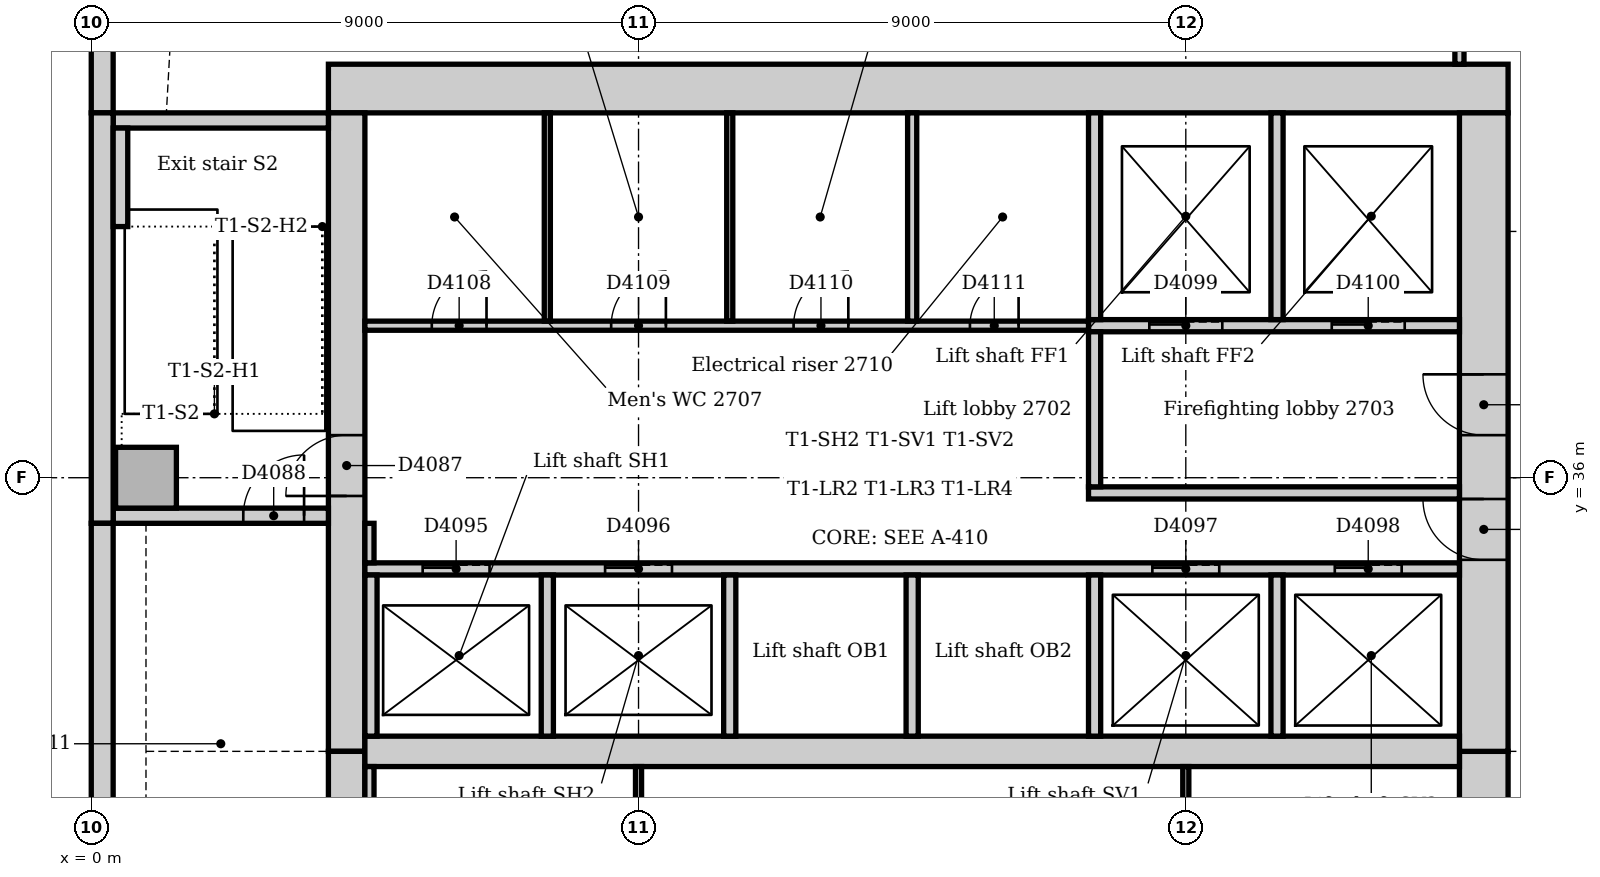
"""IFC4 building model, lengths in metres.
Left out: names, types, materials, properties, quantities, classifications, styles, units other than length and angle.
Written with IfcOpenShell. Run it as: python <this file> out.ifc"""

import sys

from ifc_helpers import new_model, si_unit, direction, frame, frame_2d, origin, origin_2d, place, context, subcontext, project, spatial, rectangle, extrude, element, fill, save


model = new_model("IFC4")
c1 = context("Model", 3, precision=1e-05, world=origin(), true_north=direction((0.0, 1.0)))
c2 = subcontext(c1, "Body", "Model", "MODEL_VIEW")
j1 = project(units=[si_unit("LENGTHUNIT", "METRE"), si_unit("PLANEANGLEUNIT", "RADIAN")], contexts=[c1])
p1 = place(None, origin())
s1 = spatial("IfcSite", under=j1, at=p1, CompositionType="ELEMENT")
p2 = place(p1, origin())
s2 = spatial("IfcBuilding", under=s1, at=p2, CompositionType="ELEMENT")
p3 = place(p2, frame((0.0, 0.0, 116.0)))
s3 = spatial("IfcBuildingStorey", under=s2, at=p3, CompositionType="ELEMENT", Elevation=116.0)
p4 = place(p3, frame((23.3, 42.4, 0.0), z_axis=(0.0, 0.0, 1.0), x_axis=(-1.0, 0.0, 0.0)))
e1 = element("IfcWall", 1, at=p4, inside=s3, PredefinedType="SOLIDWALL", context=c2, shape_type="SweptSolid", body=[
    extrude(rectangle(XDim=19.4, YDim=0.8, at=frame_2d((9.7, 0.0))), origin(), (0.0, 0.0, 1.0), 4.0),
])
p5 = place(p3, frame((22.9, 21.0, 0.0), z_axis=(0.0, 0.0, 1.0), x_axis=(0.0, 1.0, 0.0)))
e2 = element("IfcWall", 2, at=p5, inside=s3, PredefinedType="SOLIDWALL", context=c2, shape_type="SweptSolid", body=[
    extrude(rectangle(XDim=10.5, YDim=0.8, at=frame_2d((5.25, 0.0))), origin(), (0.0, 0.0, 1.0), 4.0),
])
p6 = place(p5, frame((4.35, 0.0, 0.0)))
e3 = element("IfcOpeningElement", 3, at=p6, cuts=e2, PredefinedType="OPENING", context=c2, shape_type="SweptSolid", body=[
    extrude(rectangle(XDim=1.8, YDim=2.1, at=frame_2d((0.9, 1.05))), frame((0.0, 0.41, 0.0), z_axis=(0.0, -1.0, 0.0), x_axis=(1.0, 0.0, 0.0)), (0.0, 0.0, 1.0), 0.82),
])
p7 = place(p3, frame((22.9, 31.5, 0.0), z_axis=(0.0, 0.0, 1.0), x_axis=(0.0, 1.0, 0.0)))
e4 = element("IfcWall", 4, at=p7, inside=s3, PredefinedType="SOLIDWALL", context=c2, shape_type="SweptSolid", body=[
    extrude(rectangle(XDim=10.5, YDim=0.8, at=frame_2d((5.25, 0.0))), origin(), (0.0, 0.0, 1.0), 4.0),
])
p8 = place(p7, frame((3.15, 0.0, 0.0)))
e5 = element("IfcOpeningElement", 5, at=p8, cuts=e4, PredefinedType="OPENING", context=c2, shape_type="SweptSolid", body=[
    extrude(rectangle(XDim=1.0, YDim=2.1, at=frame_2d((0.5, 1.05))), frame((0.0, 0.41, 0.0), z_axis=(0.0, -1.0, 0.0), x_axis=(1.0, 0.0, 0.0)), (0.0, 0.0, 1.0), 0.82),
])
p9 = place(p7, frame((5.2, 0.0, 0.0)))
e6 = element("IfcOpeningElement", 6, at=p9, cuts=e4, PredefinedType="OPENING", context=c2, shape_type="SweptSolid", body=[
    extrude(rectangle(XDim=1.0, YDim=2.1, at=frame_2d((0.5, 1.05))), frame((0.0, 0.41, 0.0), z_axis=(0.0, -1.0, 0.0), x_axis=(1.0, 0.0, 0.0)), (0.0, 0.0, 1.0), 0.82),
])
p10 = place(p3, frame((4.2, 42.0, 0.0), z_axis=(0.0, 0.0, 1.0), x_axis=(0.0, -1.0, 0.0)))
e7 = element("IfcWall", 7, at=p10, inside=s3, PredefinedType="SOLIDWALL", context=c2, shape_type="SweptSolid", body=[
    extrude(rectangle(XDim=10.5, YDim=0.6, at=frame_2d((5.25, 0.0))), origin(), (0.0, 0.0, 1.0), 4.0),
])
p11 = place(p10, frame((5.3, 0.0, 0.0)))
e8 = element("IfcOpeningElement", 8, at=p11, cuts=e7, PredefinedType="OPENING", context=c2, shape_type="SweptSolid", body=[
    extrude(rectangle(XDim=1.0, YDim=2.1, at=frame_2d((0.5, 1.05))), frame((0.0, 0.31, 0.0), z_axis=(0.0, -1.0, 0.0), x_axis=(1.0, 0.0, 0.0)), (0.0, 0.0, 1.0), 0.62),
])
p12 = place(p3, frame((4.2, 31.5, 0.0), z_axis=(0.0, 0.0, 1.0), x_axis=(0.0, -1.0, 0.0)))
e9 = element("IfcWall", 9, at=p12, inside=s3, PredefinedType="SOLIDWALL", context=c2, shape_type="SweptSolid", body=[
    extrude(rectangle(XDim=10.5, YDim=0.6, at=frame_2d((5.25, 0.0))), origin(), (0.0, 0.0, 1.0), 4.0),
])
p13 = place(p12, frame((4.25, 0.0, 0.0)))
e10 = element("IfcOpeningElement", 10, at=p13, cuts=e9, PredefinedType="OPENING", context=c2, shape_type="SweptSolid", body=[
    extrude(rectangle(XDim=1.0, YDim=2.1, at=frame_2d((0.5, 1.05))), frame((0.0, 0.31, 0.0), z_axis=(0.0, -1.0, 0.0), x_axis=(1.0, 0.0, 0.0)), (0.0, 0.0, 1.0), 0.62),
])
p14 = place(p3, frame((4.5, 31.5, 0.0), z_axis=(0.0, 0.0, 1.0), x_axis=(1.0, 0.0, 0.0)))
e11 = element("IfcWall", 11, at=p14, inside=s3, PredefinedType="SOLIDWALL", context=c2, shape_type="SweptSolid", body=[
    extrude(rectangle(XDim=18.0, YDim=0.5, at=frame_2d((9.0, 0.0))), origin(), (0.0, 0.0, 1.0), 4.0),
])
p15 = place(p3, frame((0.36, 35.375, 0.0), z_axis=(0.0, 0.0, 1.0), x_axis=(1.0, 0.0, 0.0)))
e12 = element("IfcWall", 12, at=p15, inside=s3, PredefinedType="SOLIDWALL", context=c2, shape_type="SweptSolid", body=[
    extrude(rectangle(XDim=3.54, YDim=0.25, at=frame_2d((1.77, 0.0))), origin(), (0.0, 0.0, 1.0), 4.0),
])
p16 = place(p15, frame((2.14, 0.0, 0.0)))
e13 = element("IfcOpeningElement", 13, at=p16, cuts=e12, PredefinedType="OPENING", context=c2, shape_type="SweptSolid", body=[
    extrude(rectangle(XDim=1.0, YDim=2.1, at=frame_2d((0.5, 1.05))), frame((0.0, 0.135, 0.0), z_axis=(0.0, -1.0, 0.0), x_axis=(1.0, 0.0, 0.0)), (0.0, 0.0, 1.0), 0.27),
])
p17 = place(p3, frame((3.9, 41.875, 0.0), z_axis=(0.0, 0.0, 1.0), x_axis=(-1.0, 0.0, 0.0)))
e14 = element("IfcWall", 14, at=p17, inside=s3, PredefinedType="SOLIDWALL", context=c2, shape_type="SweptSolid", body=[
    extrude(rectangle(XDim=3.54, YDim=0.25, at=frame_2d((1.77, 0.0))), origin(), (0.0, 0.0, 1.0), 4.0),
])
p18 = place(p3, frame((0.9, 36.0, 0.0), z_axis=(0.0, 0.0, 1.0), x_axis=(1.0, 0.0, 0.0)))
e15 = element("IfcColumn", 15, at=p18, inside=s3, PredefinedType="COLUMN", context=c2, shape_type="SweptSolid", body=[
    extrude(rectangle(XDim=1.0, YDim=1.0, at=origin_2d()), origin(), (0.0, 0.0, 1.0), 4.0),
])
p19 = place(p3, frame((0.18, 45.257, 0.0), z_axis=(0.0, 0.0, 1.0), x_axis=(0.0, -1.0, 0.0)))
e16 = element("IfcWall", 16, at=p19, inside=s3, PredefinedType="STANDARD", context=c2, shape_type="SweptSolid", body=[
    extrude(rectangle(XDim=3.257, YDim=0.36, at=frame_2d((1.629, 0.0))), origin(), (0.0, 0.0, 1.0), 3.85),
])
p20 = place(p3, frame((0.18, 42.0, 0.0), z_axis=(0.0, 0.0, 1.0), x_axis=(0.0, -1.0, 0.0)))
e17 = element("IfcWall", 17, at=p20, inside=s3, PredefinedType="STANDARD", context=c2, shape_type="SweptSolid", body=[
    extrude(rectangle(XDim=6.75, YDim=0.36, at=frame_2d((3.375, 0.0))), origin(), (0.0, 0.0, 1.0), 3.85),
])
p21 = place(p3, frame((0.18, 35.25, 0.0), z_axis=(0.0, 0.0, 1.0), x_axis=(0.0, -1.0, 0.0)))
e18 = element("IfcWall", 18, at=p21, inside=s3, PredefinedType="STANDARD", context=c2, shape_type="SweptSolid", body=[
    extrude(rectangle(XDim=7.5, YDim=0.36, at=frame_2d((3.75, 0.0))), origin(), (0.0, 0.0, 1.0), 3.85),
])
p22 = place(p3, frame((0.48, 40.13, 0.0), z_axis=(0.0, 0.0, 1.0), x_axis=(0.0, 1.0, 0.0)))
e19 = element("IfcWall", 19, at=p22, inside=s3, PredefinedType="STANDARD", context=c2, shape_type="SweptSolid", body=[
    extrude(rectangle(XDim=1.62, YDim=0.24, at=frame_2d((0.81, 0.0))), origin(), (0.0, 0.0, 1.0), 4.0),
])
p23 = place(p3, frame((16.4, 35.75, 0.0), z_axis=(0.0, 0.0, 1.0), x_axis=(1.0, 0.0, 0.0)))
e20 = element("IfcWall", 20, at=p23, inside=s3, PredefinedType="PARTITIONING", context=c2, shape_type="SweptSolid", body=[
    extrude(rectangle(XDim=6.1, YDim=0.2, at=frame_2d((3.05, 0.0))), origin(), (0.0, 0.0, 1.0), 3.85),
])
p24 = place(p3, frame((16.4, 38.5, 0.0), z_axis=(0.0, 0.0, 1.0), x_axis=(1.0, 0.0, 0.0)))
e21 = element("IfcWall", 21, at=p24, inside=s3, PredefinedType="PARTITIONING", context=c2, shape_type="SweptSolid", body=[
    extrude(rectangle(XDim=6.1, YDim=0.2, at=frame_2d((3.05, 0.0))), origin(), (0.0, 0.0, 1.0), 3.85),
])
p25 = place(p24, frame((1.0, 0.0, 0.0)))
e22 = element("IfcOpeningElement", 22, at=p25, cuts=e21, PredefinedType="OPENING", context=c2, shape_type="SweptSolid", body=[
    extrude(rectangle(XDim=1.2, YDim=2.1, at=frame_2d((0.6, 1.05))), frame((0.0, 0.11, 0.0), z_axis=(0.0, -1.0, 0.0), x_axis=(1.0, 0.0, 0.0)), (0.0, 0.0, 1.0), 0.22),
])
p26 = place(p24, frame((4.0, 0.0, 0.0)))
e23 = element("IfcOpeningElement", 23, at=p26, cuts=e21, PredefinedType="OPENING", context=c2, shape_type="SweptSolid", body=[
    extrude(rectangle(XDim=1.2, YDim=2.1, at=frame_2d((0.6, 1.05))), frame((0.0, 0.11, 0.0), z_axis=(0.0, -1.0, 0.0), x_axis=(1.0, 0.0, 0.0)), (0.0, 0.0, 1.0), 0.22),
])
p27 = place(p3, frame((16.5, 35.85, 0.0), z_axis=(0.0, 0.0, 1.0), x_axis=(0.0, 1.0, 0.0)))
e24 = element("IfcWall", 24, at=p27, inside=s3, PredefinedType="PARTITIONING", context=c2, shape_type="SweptSolid", body=[
    extrude(rectangle(XDim=2.55, YDim=0.2, at=frame_2d((1.275, 0.0))), origin(), (0.0, 0.0, 1.0), 3.85),
])
p28 = place(p3, frame((4.5, 34.5, 0.0), z_axis=(0.0, 0.0, 1.0), x_axis=(1.0, 0.0, 0.0)))
e25 = element("IfcWall", 25, at=p28, inside=s3, PredefinedType="PARTITIONING", context=c2, shape_type="SweptSolid", body=[
    extrude(rectangle(XDim=18.0, YDim=0.2, at=frame_2d((9.0, 0.0))), origin(), (0.0, 0.0, 1.0), 3.85),
])
p29 = place(p28, frame((0.95, 0.0, 0.0)))
e26 = element("IfcOpeningElement", 26, at=p29, cuts=e25, PredefinedType="OPENING", context=c2, shape_type="SweptSolid", body=[
    extrude(rectangle(XDim=1.1, YDim=2.1, at=frame_2d((0.55, 1.05))), frame((0.0, 0.11, 0.0), z_axis=(0.0, -1.0, 0.0), x_axis=(1.0, 0.0, 0.0)), (0.0, 0.0, 1.0), 0.22),
])
p30 = place(p28, frame((3.95, 0.0, 0.0)))
e27 = element("IfcOpeningElement", 27, at=p30, cuts=e25, PredefinedType="OPENING", context=c2, shape_type="SweptSolid", body=[
    extrude(rectangle(XDim=1.1, YDim=2.1, at=frame_2d((0.55, 1.05))), frame((0.0, 0.11, 0.0), z_axis=(0.0, -1.0, 0.0), x_axis=(1.0, 0.0, 0.0)), (0.0, 0.0, 1.0), 0.22),
])
p31 = place(p28, frame((12.95, 0.0, 0.0)))
e28 = element("IfcOpeningElement", 28, at=p31, cuts=e25, PredefinedType="OPENING", context=c2, shape_type="SweptSolid", body=[
    extrude(rectangle(XDim=1.1, YDim=2.1, at=frame_2d((0.55, 1.05))), frame((0.0, 0.11, 0.0), z_axis=(0.0, -1.0, 0.0), x_axis=(1.0, 0.0, 0.0)), (0.0, 0.0, 1.0), 0.22),
])
p32 = place(p28, frame((15.95, 0.0, 0.0)))
e29 = element("IfcOpeningElement", 29, at=p32, cuts=e25, PredefinedType="OPENING", context=c2, shape_type="SweptSolid", body=[
    extrude(rectangle(XDim=1.1, YDim=2.1, at=frame_2d((0.55, 1.05))), frame((0.0, 0.11, 0.0), z_axis=(0.0, -1.0, 0.0), x_axis=(1.0, 0.0, 0.0)), (0.0, 0.0, 1.0), 0.22),
])
for number, where, z_axis, x_axis in (
    (30, (16.5, 38.6, 0.0), (0.0, 0.0, 1.0), (0.0, 1.0, 0.0)),
    (31, (19.5, 38.6, 0.0), (0.0, 0.0, 1.0), (0.0, 1.0, 0.0)),
):
    element("IfcWall", number, at=place(p3, frame(where, z_axis=z_axis, x_axis=x_axis)), inside=s3, PredefinedType="PARTITIONING", context=c2, shape_type="SweptSolid", body=[
        extrude(rectangle(XDim=3.4, YDim=0.2, at=frame_2d((1.7, 0.0))), origin(), (0.0, 0.0, 1.0), 3.85),
    ])
for number, where, z_axis, x_axis in (
    (32, (4.6, 31.75, 0.0), (0.0, 0.0, 1.0), (0.0, 1.0, 0.0)),
    (33, (7.5, 31.75, 0.0), (0.0, 0.0, 1.0), (0.0, 1.0, 0.0)),
    (34, (10.5, 31.75, 0.0), (0.0, 0.0, 1.0), (0.0, 1.0, 0.0)),
    (35, (13.5, 31.75, 0.0), (0.0, 0.0, 1.0), (0.0, 1.0, 0.0)),
    (36, (16.5, 31.75, 0.0), (0.0, 0.0, 1.0), (0.0, 1.0, 0.0)),
    (37, (19.5, 31.75, 0.0), (0.0, 0.0, 1.0), (0.0, 1.0, 0.0)),
):
    element("IfcWall", number, at=place(p3, frame(where, z_axis=z_axis, x_axis=x_axis)), inside=s3, PredefinedType="PARTITIONING", context=c2, shape_type="SweptSolid", body=[
        extrude(rectangle(XDim=2.65, YDim=0.2, at=frame_2d((1.325, 0.0))), origin(), (0.0, 0.0, 1.0), 3.85),
    ])
p33 = place(p3, frame((4.5, 38.5, 0.0), z_axis=(0.0, 0.0, 1.0), x_axis=(1.0, 0.0, 0.0)))
e38 = element("IfcWall", 38, at=p33, inside=s3, PredefinedType="PARTITIONING", context=c2, shape_type="SweptSolid", body=[
    extrude(rectangle(XDim=11.9, YDim=0.15, at=frame_2d((5.95, 0.0))), origin(), (0.0, 0.0, 1.0), 3.85),
])
p34 = place(p33, frame((1.1, 0.0, 0.0)))
e39 = element("IfcOpeningElement", 39, at=p34, cuts=e38, PredefinedType="OPENING", context=c2, shape_type="SweptSolid", body=[
    extrude(rectangle(XDim=0.9, YDim=2.1, at=frame_2d((0.45, 1.05))), frame((0.0, 0.085, 0.0), z_axis=(0.0, -1.0, 0.0), x_axis=(1.0, 0.0, 0.0)), (0.0, 0.0, 1.0), 0.17),
])
p35 = place(p33, frame((4.05, 0.0, 0.0)))
e40 = element("IfcOpeningElement", 40, at=p35, cuts=e38, PredefinedType="OPENING", context=c2, shape_type="SweptSolid", body=[
    extrude(rectangle(XDim=0.9, YDim=2.1, at=frame_2d((0.45, 1.05))), frame((0.0, 0.085, 0.0), z_axis=(0.0, -1.0, 0.0), x_axis=(1.0, 0.0, 0.0)), (0.0, 0.0, 1.0), 0.17),
])
p36 = place(p33, frame((7.05, 0.0, 0.0)))
e41 = element("IfcOpeningElement", 41, at=p36, cuts=e38, PredefinedType="OPENING", context=c2, shape_type="SweptSolid", body=[
    extrude(rectangle(XDim=0.9, YDim=2.1, at=frame_2d((0.45, 1.05))), frame((0.0, 0.085, 0.0), z_axis=(0.0, -1.0, 0.0), x_axis=(1.0, 0.0, 0.0)), (0.0, 0.0, 1.0), 0.17),
])
p37 = place(p33, frame((9.95, 0.0, 0.0)))
e42 = element("IfcOpeningElement", 42, at=p37, cuts=e38, PredefinedType="OPENING", context=c2, shape_type="SweptSolid", body=[
    extrude(rectangle(XDim=0.8, YDim=2.1, at=frame_2d((0.4, 1.05))), frame((0.0, 0.085, 0.0), z_axis=(0.0, -1.0, 0.0), x_axis=(1.0, 0.0, 0.0)), (0.0, 0.0, 1.0), 0.17),
])
p38 = place(p3, frame((4.575, 28.575, 0.0), z_axis=(0.0, 0.0, 1.0), x_axis=(0.0, 1.0, 0.0)))
e43 = element("IfcWall", 43, at=p38, inside=s3, PredefinedType="PARTITIONING", context=c2, shape_type="SweptSolid", body=[
    extrude(rectangle(XDim=2.675, YDim=0.15, at=frame_2d((1.337, 0.0))), origin(), (0.0, 0.0, 1.0), 3.85),
])
p39 = place(p3, frame((22.5, 42.8, 0.0), z_axis=(0.0, 0.0, 1.0), x_axis=(0.0, 1.0, 0.0)))
e44 = element("IfcWall", 44, at=p39, inside=s3, PredefinedType="PARTITIONING", context=c2, shape_type="SweptSolid", body=[
    extrude(rectangle(XDim=1.725, YDim=0.15, at=frame_2d((0.863, 0.0))), origin(), (0.0, 0.0, 1.0), 3.85),
])
p40 = place(p3, frame((4.575, 34.6, 0.0), z_axis=(0.0, 0.0, 1.0), x_axis=(0.0, 1.0, 0.0)))
e45 = element("IfcWall", 45, at=p40, inside=s3, PredefinedType="PARTITIONING", context=c2, shape_type="SweptSolid", body=[
    extrude(rectangle(XDim=0.65, YDim=0.15, at=frame_2d((0.325, 0.0))), origin(), (0.0, 0.0, 1.0), 3.85),
])
p41 = place(p3, frame((13.5, 38.575, 0.0), z_axis=(0.0, 0.0, 1.0), x_axis=(0.0, 1.0, 0.0)))
e46 = element("IfcWall", 46, at=p41, inside=s3, PredefinedType="PARTITIONING", context=c2, shape_type="SweptSolid", body=[
    extrude(rectangle(XDim=3.425, YDim=0.15, at=frame_2d((1.712, 0.0))), origin(), (0.0, 0.0, 1.0), 3.85),
])
for number, where, z_axis, x_axis in (
    (47, (7.5, 38.575, 0.0), (0.0, 0.0, 1.0), (0.0, 1.0, 0.0)),
    (48, (10.5, 38.575, 0.0), (0.0, 0.0, 1.0), (0.0, 1.0, 0.0)),
):
    element("IfcWall", number, at=place(p3, frame(where, z_axis=z_axis, x_axis=x_axis)), inside=s3, PredefinedType="PARTITIONING", context=c2, shape_type="SweptSolid", body=[
        extrude(rectangle(XDim=3.425, YDim=0.1, at=frame_2d((1.712, 0.0))), origin(), (0.0, 0.0, 1.0), 3.85),
    ])
for number, where, z_axis, x_axis in (
    (49, (9.0, 28.575, 0.0), (0.0, 0.0, 1.0), (0.0, 1.0, 0.0)),
    (50, (18.0, 28.575, 0.0), (0.0, 0.0, 1.0), (0.0, 1.0, 0.0)),
):
    element("IfcWall", number, at=place(p3, frame(where, z_axis=z_axis, x_axis=x_axis)), inside=s3, PredefinedType="PARTITIONING", context=c2, shape_type="SweptSolid", body=[
        extrude(rectangle(XDim=2.675, YDim=0.1, at=frame_2d((1.337, 0.0))), origin(), (0.0, 0.0, 1.0), 3.85),
    ])
p42 = place(p11, frame((1.0, 0.0, 0.0), z_axis=(0.0, 0.0, 1.0), x_axis=(-1.0, 0.0, 0.0)))
e51 = element("IfcDoor", 51, at=p42, inside=s3, OperationType="SINGLE_SWING_LEFT", PredefinedType="DOOR", context=c2, shape_type="SweptSolid", body=[
    extrude(rectangle(XDim=1.0, YDim=2.1, at=frame_2d((0.5, 1.05))), frame((0.0, 0.025, 0.0), z_axis=(0.0, -1.0, 0.0), x_axis=(1.0, 0.0, 0.0)), (0.0, 0.0, 1.0), 0.05),
])
fill(e8, e51)
p43 = place(p16, origin())
e52 = element("IfcDoor", 52, at=p43, inside=s3, OperationType="SINGLE_SWING_RIGHT", PredefinedType="DOOR", context=c2, shape_type="SweptSolid", body=[
    extrude(rectangle(XDim=1.0, YDim=2.1, at=frame_2d((0.5, 1.05))), frame((0.0, 0.025, 0.0), z_axis=(0.0, -1.0, 0.0), x_axis=(1.0, 0.0, 0.0)), (0.0, 0.0, 1.0), 0.05),
])
fill(e13, e52)
p44 = place(p29, origin())
e53 = element("IfcDoor", 53, at=p44, inside=s3, OperationType="SLIDING_TO_LEFT", PredefinedType="DOOR", context=c2, shape_type="SweptSolid", body=[
    extrude(rectangle(XDim=1.1, YDim=2.1, at=frame_2d((0.55, 1.05))), frame((0.0, 0.025, 0.0), z_axis=(0.0, -1.0, 0.0), x_axis=(1.0, 0.0, 0.0)), (0.0, 0.0, 1.0), 0.05),
])
fill(e26, e53)
p45 = place(p30, origin())
e54 = element("IfcDoor", 54, at=p45, inside=s3, OperationType="SLIDING_TO_LEFT", PredefinedType="DOOR", context=c2, shape_type="SweptSolid", body=[
    extrude(rectangle(XDim=1.1, YDim=2.1, at=frame_2d((0.55, 1.05))), frame((0.0, 0.025, 0.0), z_axis=(0.0, -1.0, 0.0), x_axis=(1.0, 0.0, 0.0)), (0.0, 0.0, 1.0), 0.05),
])
fill(e27, e54)
p46 = place(p31, origin())
e55 = element("IfcDoor", 55, at=p46, inside=s3, OperationType="SLIDING_TO_LEFT", PredefinedType="DOOR", context=c2, shape_type="SweptSolid", body=[
    extrude(rectangle(XDim=1.1, YDim=2.1, at=frame_2d((0.55, 1.05))), frame((0.0, 0.025, 0.0), z_axis=(0.0, -1.0, 0.0), x_axis=(1.0, 0.0, 0.0)), (0.0, 0.0, 1.0), 0.05),
])
fill(e28, e55)
p47 = place(p32, origin())
e56 = element("IfcDoor", 56, at=p47, inside=s3, OperationType="SLIDING_TO_LEFT", PredefinedType="DOOR", context=c2, shape_type="SweptSolid", body=[
    extrude(rectangle(XDim=1.1, YDim=2.1, at=frame_2d((0.55, 1.05))), frame((0.0, 0.025, 0.0), z_axis=(0.0, -1.0, 0.0), x_axis=(1.0, 0.0, 0.0)), (0.0, 0.0, 1.0), 0.05),
])
fill(e29, e56)
p48 = place(p25, origin())
e57 = element("IfcDoor", 57, at=p48, inside=s3, OperationType="SLIDING_TO_LEFT", PredefinedType="DOOR", context=c2, shape_type="SweptSolid", body=[
    extrude(rectangle(XDim=1.2, YDim=2.1, at=frame_2d((0.6, 1.05))), frame((0.0, 0.025, 0.0), z_axis=(0.0, -1.0, 0.0), x_axis=(1.0, 0.0, 0.0)), (0.0, 0.0, 1.0), 0.05),
])
fill(e22, e57)
p49 = place(p26, origin())
e58 = element("IfcDoor", 58, at=p49, inside=s3, OperationType="SLIDING_TO_LEFT", PredefinedType="DOOR", context=c2, shape_type="SweptSolid", body=[
    extrude(rectangle(XDim=1.2, YDim=2.1, at=frame_2d((0.6, 1.05))), frame((0.0, 0.025, 0.0), z_axis=(0.0, -1.0, 0.0), x_axis=(1.0, 0.0, 0.0)), (0.0, 0.0, 1.0), 0.05),
])
fill(e23, e58)
p50 = place(p8, origin())
e59 = element("IfcDoor", 59, at=p50, inside=s3, OperationType="SINGLE_SWING_RIGHT", PredefinedType="DOOR", context=c2, shape_type="SweptSolid", body=[
    extrude(rectangle(XDim=1.0, YDim=2.1, at=frame_2d((0.5, 1.05))), frame((0.0, 0.025, 0.0), z_axis=(0.0, -1.0, 0.0), x_axis=(1.0, 0.0, 0.0)), (0.0, 0.0, 1.0), 0.05),
])
fill(e5, e59)
p51 = place(p9, origin())
e60 = element("IfcDoor", 60, at=p51, inside=s3, OperationType="SINGLE_SWING_RIGHT", PredefinedType="DOOR", context=c2, shape_type="SweptSolid", body=[
    extrude(rectangle(XDim=1.0, YDim=2.1, at=frame_2d((0.5, 1.05))), frame((0.0, 0.025, 0.0), z_axis=(0.0, -1.0, 0.0), x_axis=(1.0, 0.0, 0.0)), (0.0, 0.0, 1.0), 0.05),
])
fill(e6, e60)
p52 = place(p34, origin())
e61 = element("IfcDoor", 61, at=p52, inside=s3, OperationType="SINGLE_SWING_RIGHT", PredefinedType="DOOR", context=c2, shape_type="SweptSolid", body=[
    extrude(rectangle(XDim=0.9, YDim=2.1, at=frame_2d((0.45, 1.05))), frame((0.0, 0.025, 0.0), z_axis=(0.0, -1.0, 0.0), x_axis=(1.0, 0.0, 0.0)), (0.0, 0.0, 1.0), 0.05),
])
fill(e39, e61)
p53 = place(p35, origin())
e62 = element("IfcDoor", 62, at=p53, inside=s3, OperationType="SINGLE_SWING_RIGHT", PredefinedType="DOOR", context=c2, shape_type="SweptSolid", body=[
    extrude(rectangle(XDim=0.9, YDim=2.1, at=frame_2d((0.45, 1.05))), frame((0.0, 0.025, 0.0), z_axis=(0.0, -1.0, 0.0), x_axis=(1.0, 0.0, 0.0)), (0.0, 0.0, 1.0), 0.05),
])
fill(e40, e62)
p54 = place(p36, origin())
e63 = element("IfcDoor", 63, at=p54, inside=s3, OperationType="SINGLE_SWING_RIGHT", PredefinedType="DOOR", context=c2, shape_type="SweptSolid", body=[
    extrude(rectangle(XDim=0.9, YDim=2.1, at=frame_2d((0.45, 1.05))), frame((0.0, 0.025, 0.0), z_axis=(0.0, -1.0, 0.0), x_axis=(1.0, 0.0, 0.0)), (0.0, 0.0, 1.0), 0.05),
])
fill(e41, e63)
p55 = place(p37, origin())
e64 = element("IfcDoor", 64, at=p55, inside=s3, OperationType="SINGLE_SWING_RIGHT", PredefinedType="DOOR", context=c2, shape_type="SweptSolid", body=[
    extrude(rectangle(XDim=0.8, YDim=2.1, at=frame_2d((0.4, 1.05))), frame((0.0, 0.025, 0.0), z_axis=(0.0, -1.0, 0.0), x_axis=(1.0, 0.0, 0.0)), (0.0, 0.0, 1.0), 0.05),
])
fill(e42, e64)
save(model, sys.argv[1])
